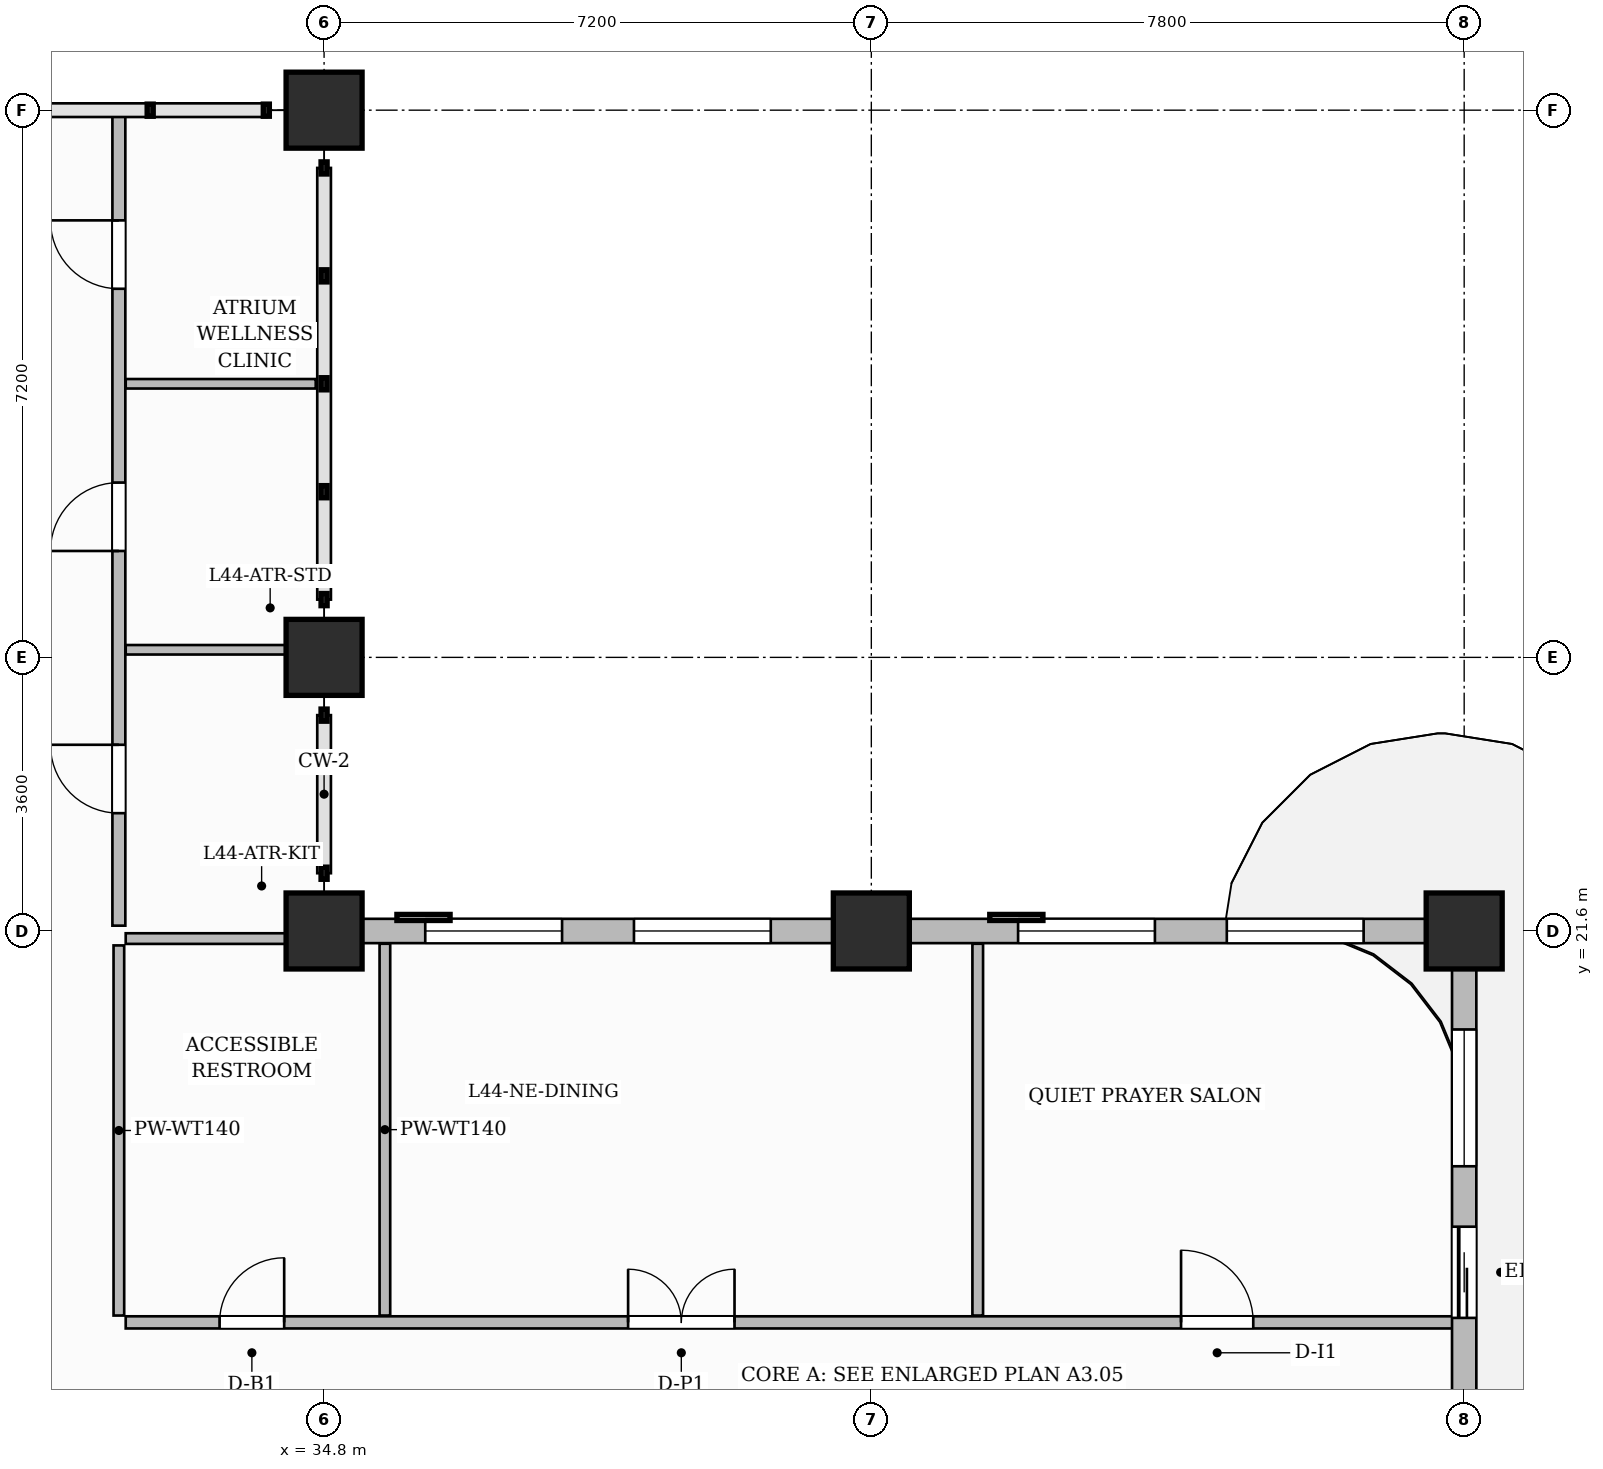
"""IFC4 building model, lengths in metres.
Left out: names, types, materials, properties, quantities, classifications, styles, units other than length and angle.
Written with IfcOpenShell. Run it as: python <this file> out.ifc"""

import sys

from ifc_helpers import new_model, si_unit, direction, frame, frame_2d, origin, origin_2d, place, context, subcontext, project, spatial, rectangle, extrude, source, transform, mapped, element, fill, save


model = new_model("IFC4")
c1 = context("Model", 3, precision=1e-05, world=origin(), true_north=direction((0.0, 1.0)))
c2 = subcontext(c1, "Body", "Model", "MODEL_VIEW")
j1 = project(units=[si_unit("LENGTHUNIT", "METRE"), si_unit("PLANEANGLEUNIT", "RADIAN")], contexts=[c1])
p1 = place(None, origin())
s1 = spatial("IfcSite", under=j1, at=p1, CompositionType="ELEMENT")
p2 = place(p1, origin())
s2 = spatial("IfcBuilding", under=s1, at=p2, CompositionType="ELEMENT")
p3 = place(p2, frame((0.0, 0.0, 177.25)))
s3 = spatial("IfcBuildingStorey", under=s2, at=p3, CompositionType="ELEMENT", Elevation=177.25)
m1 = source(origin(), c2, "Body", "SweptSolid", [
    extrude(rectangle(XDim=1.0, YDim=1.0, at=origin_2d()), origin(), (0.0, 0.0, 1.0), 3.85),
])
for number, where, z_axis, x_axis in (
    (1, (34.8, 21.6, 0.0), (0.0, 0.0, 1.0), (1.0, 0.0, 0.0)),
    (2, (34.8, 25.2, 0.0), (0.0, 0.0, 1.0), (1.0, 0.0, 0.0)),
    (3, (34.8, 32.4, 0.0), (0.0, 0.0, 1.0), (1.0, 0.0, 0.0)),
    (4, (42.0, 21.6, 0.0), (0.0, 0.0, 1.0), (1.0, 0.0, 0.0)),
    (5, (49.8, 21.6, 0.0), (0.0, 0.0, 1.0), (1.0, 0.0, 0.0)),
):
    element("IfcColumn", number, at=place(p3, frame(where, z_axis=z_axis, x_axis=x_axis)), inside=s3, PredefinedType="COLUMN", context=c2, shape_type="MappedRepresentation", body=[
        mapped(m1, transform((0.0, 0.0, 0.0), scale=1.0)),
    ])
p4 = place(p3, frame((32.19, 16.45, 0.0), z_axis=(0.0, 0.0, 1.0), x_axis=(1.0, 0.0, 0.0)))
e6 = element("IfcWall", 6, at=p4, inside=s3, PredefinedType="PARTITIONING", context=c2, shape_type="SweptSolid", body=[
    extrude(rectangle(XDim=17.47, YDim=0.16, at=frame_2d((8.735, 0.0))), origin(), (0.0, 0.0, 1.0), 3.6),
])
p5 = place(p4, frame((1.235, 0.0, 0.0)))
e7 = element("IfcOpeningElement", 7, at=p5, cuts=e6, PredefinedType="OPENING", context=c2, shape_type="SweptSolid", body=[
    extrude(rectangle(XDim=0.85, YDim=2.1, at=frame_2d((0.425, 1.05))), frame((0.0, 0.09, 0.0), z_axis=(0.0, -1.0, 0.0), x_axis=(1.0, 0.0, 0.0)), (0.0, 0.0, 1.0), 0.18),
])
p6 = place(p4, frame((6.61, 0.0, 0.0)))
e8 = element("IfcOpeningElement", 8, at=p6, cuts=e6, PredefinedType="OPENING", context=c2, shape_type="SweptSolid", body=[
    extrude(rectangle(XDim=1.4, YDim=2.35, at=frame_2d((0.7, 1.175))), frame((0.0, 0.09, 0.0), z_axis=(0.0, -1.0, 0.0), x_axis=(1.0, 0.0, 0.0)), (0.0, 0.0, 1.0), 0.18),
])
p7 = place(p4, frame((13.885, 0.0, 0.0)))
e9 = element("IfcOpeningElement", 9, at=p7, cuts=e6, PredefinedType="OPENING", context=c2, shape_type="SweptSolid", body=[
    extrude(rectangle(XDim=0.95, YDim=2.15, at=frame_2d((0.475, 1.075))), frame((0.0, 0.09, 0.0), z_axis=(0.0, -1.0, 0.0), x_axis=(1.0, 0.0, 0.0)), (0.0, 0.0, 1.0), 0.18),
])
p8 = place(p3, frame((32.1, 16.54, 0.0), z_axis=(0.0, 0.0, 1.0), x_axis=(0.0, 1.0, 0.0)))
e10 = element("IfcWall", 10, at=p8, inside=s3, PredefinedType="PARTITIONING", context=c2, shape_type="SweptSolid", body=[
    extrude(rectangle(XDim=4.87, YDim=0.14, at=frame_2d((2.435, 0.0))), origin(), (0.0, 0.0, 1.0), 3.6),
])
for number, where, z_axis, x_axis in (
    (11, (35.6, 16.54, 0.0), (0.0, 0.0, 1.0), (0.0, 1.0, 0.0)),
    (12, (43.4, 16.54, 0.0), (0.0, 0.0, 1.0), (0.0, 1.0, 0.0)),
):
    element("IfcWall", number, at=place(p3, frame(where, z_axis=z_axis, x_axis=x_axis)), inside=s3, PredefinedType="PARTITIONING", context=c2, shape_type="SweptSolid", body=[
        extrude(rectangle(XDim=4.892, YDim=0.14, at=frame_2d((2.446, 0.0))), origin(), (0.0, 0.0, 1.0), 3.6),
    ])
p9 = place(p3, frame((32.19, 21.5, 0.0), z_axis=(0.0, 0.0, 1.0), x_axis=(1.0, 0.0, 0.0)))
e13 = element("IfcWall", 13, at=p9, inside=s3, PredefinedType="PARTITIONING", context=c2, shape_type="SweptSolid", body=[
    extrude(rectangle(XDim=2.42, YDim=0.14, at=frame_2d((1.21, 0.0))), origin(), (0.0, 0.0, 1.0), 3.085),
])
p10 = place(p3, frame((32.1, 21.67, 0.0), z_axis=(0.0, 0.0, 1.0), x_axis=(0.0, 1.0, 0.0)))
e14 = element("IfcWall", 14, at=p10, inside=s3, PredefinedType="PARTITIONING", context=c2, shape_type="SweptSolid", body=[
    extrude(rectangle(XDim=10.702, YDim=0.17, at=frame_2d((5.351, 0.0))), origin(), (0.0, 0.0, 1.0), 3.6),
])
p11 = place(p10, frame((1.48, 0.0, 0.0)))
e15 = element("IfcOpeningElement", 15, at=p11, cuts=e14, PredefinedType="OPENING", context=c2, shape_type="SweptSolid", body=[
    extrude(rectangle(XDim=0.9, YDim=2.15, at=frame_2d((0.45, 1.075))), frame((0.0, 0.095, 0.0), z_axis=(0.0, -1.0, 0.0), x_axis=(1.0, 0.0, 0.0)), (0.0, 0.0, 1.0), 0.19),
])
p12 = place(p10, frame((4.93, 0.0, 0.0)))
e16 = element("IfcOpeningElement", 16, at=p12, cuts=e14, PredefinedType="OPENING", context=c2, shape_type="SweptSolid", body=[
    extrude(rectangle(XDim=0.9, YDim=2.15, at=frame_2d((0.45, 1.075))), frame((0.0, 0.095, 0.0), z_axis=(0.0, -1.0, 0.0), x_axis=(1.0, 0.0, 0.0)), (0.0, 0.0, 1.0), 0.19),
])
p13 = place(p10, frame((8.38, 0.0, 0.0)))
e17 = element("IfcOpeningElement", 17, at=p13, cuts=e14, PredefinedType="OPENING", context=c2, shape_type="SweptSolid", body=[
    extrude(rectangle(XDim=0.9, YDim=2.15, at=frame_2d((0.45, 1.075))), frame((0.0, 0.095, 0.0), z_axis=(0.0, -1.0, 0.0), x_axis=(1.0, 0.0, 0.0)), (0.0, 0.0, 1.0), 0.19),
])
for number, where, z_axis, x_axis in (
    (18, (32.19, 25.3, 0.0), (0.0, 0.0, 1.0), (1.0, 0.0, 0.0)),
    (19, (32.19, 28.8, 0.0), (0.0, 0.0, 1.0), (1.0, 0.0, 0.0)),
):
    element("IfcWall", number, at=place(p3, frame(where, z_axis=z_axis, x_axis=x_axis)), inside=s3, PredefinedType="PARTITIONING", context=c2, shape_type="SweptSolid", body=[
        extrude(rectangle(XDim=2.5, YDim=0.125, at=frame_2d((1.25, 0.0))), origin(), (0.0, 0.0, 1.0), 3.6),
    ])
p14 = place(p3, frame((49.8, 14.62, 0.0), z_axis=(0.0, 0.0, 1.0), x_axis=(0.0, 1.0, 0.0)))
e20 = element("IfcWall", 20, at=p14, inside=s3, PredefinedType="SOLIDWALL", context=c2, shape_type="SweptSolid", body=[
    extrude(rectangle(XDim=6.93, YDim=0.32, at=frame_2d((3.465, 0.0))), origin(), (0.0, 0.0, 1.0), 3.085),
])
p15 = place(p14, frame((1.889, 0.0, 0.0)))
e21 = element("IfcOpeningElement", 21, at=p15, cuts=e20, PredefinedType="OPENING", context=c2, shape_type="SweptSolid", body=[
    extrude(rectangle(XDim=1.2, YDim=2.2, at=frame_2d((0.6, 1.1))), frame((0.0, 0.17, 0.0), z_axis=(0.0, -1.0, 0.0), x_axis=(1.0, 0.0, 0.0)), (0.0, 0.0, 1.0), 0.34),
])
p16 = place(p14, frame((3.884, 0.0, 0.8)))
e22 = element("IfcOpeningElement", 22, at=p16, cuts=e20, PredefinedType="OPENING", context=c2, shape_type="SweptSolid", body=[
    extrude(rectangle(XDim=1.8, YDim=1.85, at=frame_2d((0.9, 0.925))), frame((0.0, 0.17, 0.0), z_axis=(0.0, -1.0, 0.0), x_axis=(1.0, 0.0, 0.0)), (0.0, 0.0, 1.0), 0.34),
])
p17 = place(p3, frame((34.8, 21.6, 0.0), z_axis=(0.0, 0.0, 1.0), x_axis=(1.0, 0.0, 0.0)))
e23 = element("IfcWall", 23, at=p17, inside=s3, PredefinedType="SOLIDWALL", context=c2, shape_type="SweptSolid", body=[
    extrude(rectangle(XDim=15.0, YDim=0.32, at=frame_2d((7.5, 0.0))), origin(), (0.0, 0.0, 1.0), 3.085),
])
p18 = place(p17, frame((1.331, 0.0, 0.8)))
e24 = element("IfcOpeningElement", 24, at=p18, cuts=e23, PredefinedType="OPENING", context=c2, shape_type="SweptSolid", body=[
    extrude(rectangle(XDim=1.8, YDim=1.85, at=frame_2d((0.9, 0.925))), frame((0.0, 0.17, 0.0), z_axis=(0.0, -1.0, 0.0), x_axis=(1.0, 0.0, 0.0)), (0.0, 0.0, 1.0), 0.34),
])
p19 = place(p17, frame((4.077, 0.0, 0.8)))
e25 = element("IfcOpeningElement", 25, at=p19, cuts=e23, PredefinedType="OPENING", context=c2, shape_type="SweptSolid", body=[
    extrude(rectangle(XDim=1.8, YDim=1.85, at=frame_2d((0.9, 0.925))), frame((0.0, 0.17, 0.0), z_axis=(0.0, -1.0, 0.0), x_axis=(1.0, 0.0, 0.0)), (0.0, 0.0, 1.0), 0.34),
])
p20 = place(p17, frame((9.131, 0.0, 0.8)))
e26 = element("IfcOpeningElement", 26, at=p20, cuts=e23, PredefinedType="OPENING", context=c2, shape_type="SweptSolid", body=[
    extrude(rectangle(XDim=1.8, YDim=1.85, at=frame_2d((0.9, 0.925))), frame((0.0, 0.17, 0.0), z_axis=(0.0, -1.0, 0.0), x_axis=(1.0, 0.0, 0.0)), (0.0, 0.0, 1.0), 0.34),
])
p21 = place(p17, frame((11.877, 0.0, 0.8)))
e27 = element("IfcOpeningElement", 27, at=p21, cuts=e23, PredefinedType="OPENING", context=c2, shape_type="SweptSolid", body=[
    extrude(rectangle(XDim=1.8, YDim=1.85, at=frame_2d((0.9, 0.925))), frame((0.0, 0.17, 0.0), z_axis=(0.0, -1.0, 0.0), x_axis=(1.0, 0.0, 0.0)), (0.0, 0.0, 1.0), 0.34),
])
m2 = source(origin(), c2, "Body", "SweptSolid", [
    extrude(rectangle(XDim=0.85, YDim=2.1, at=frame_2d((0.425, 1.05))), frame((0.0, 0.025, 0.0), z_axis=(0.0, -1.0, 0.0), x_axis=(1.0, 0.0, 0.0)), (0.0, 0.0, 1.0), 0.05),
])
p22 = place(p5, origin())
e28 = element("IfcDoor", 28, at=p22, inside=s3, OperationType="SINGLE_SWING_RIGHT", PredefinedType="DOOR", context=c2, shape_type="MappedRepresentation", body=[
    mapped(m2, transform((0.0, 0.0, 0.0), scale=1.0)),
])
fill(e7, e28)
m3 = source(origin(), c2, "Body", "SweptSolid", [
    extrude(rectangle(XDim=1.4, YDim=2.35, at=frame_2d((0.7, 1.175))), frame((0.0, 0.025, 0.0), z_axis=(0.0, -1.0, 0.0), x_axis=(1.0, 0.0, 0.0)), (0.0, 0.0, 1.0), 0.05),
])
p23 = place(p6, origin())
e29 = element("IfcDoor", 29, at=p23, inside=s3, OperationType="DOUBLE_DOOR_SINGLE_SWING", PredefinedType="DOOR", context=c2, shape_type="MappedRepresentation", body=[
    mapped(m3, transform((0.0, 0.0, 0.0), scale=1.0)),
])
fill(e8, e29)
m4 = source(origin(), c2, "Body", "SweptSolid", [
    extrude(rectangle(XDim=0.95, YDim=2.15, at=frame_2d((0.475, 1.075))), frame((0.0, 0.025, 0.0), z_axis=(0.0, -1.0, 0.0), x_axis=(1.0, 0.0, 0.0)), (0.0, 0.0, 1.0), 0.05),
])
p24 = place(p7, origin())
e30 = element("IfcDoor", 30, at=p24, inside=s3, OperationType="SINGLE_SWING_LEFT", PredefinedType="DOOR", context=c2, shape_type="MappedRepresentation", body=[
    mapped(m4, transform((0.0, 0.0, 0.0), scale=1.0)),
])
fill(e9, e30)
m5 = source(origin(), c2, "Body", "SweptSolid", [
    extrude(rectangle(XDim=0.9, YDim=2.15, at=frame_2d((0.45, 1.075))), frame((0.0, 0.025, 0.0), z_axis=(0.0, -1.0, 0.0), x_axis=(1.0, 0.0, 0.0)), (0.0, 0.0, 1.0), 0.05),
])
p25 = place(p11, origin())
e31 = element("IfcDoor", 31, at=p25, inside=s3, OperationType="SINGLE_SWING_RIGHT", PredefinedType="DOOR", context=c2, shape_type="MappedRepresentation", body=[
    mapped(m5, transform((0.0, 0.0, 0.0), scale=1.0)),
])
fill(e15, e31)
p26 = place(p12, origin())
e32 = element("IfcDoor", 32, at=p26, inside=s3, OperationType="SINGLE_SWING_LEFT", PredefinedType="DOOR", context=c2, shape_type="MappedRepresentation", body=[
    mapped(m5, transform((0.0, 0.0, 0.0), scale=1.0)),
])
fill(e16, e32)
p27 = place(p13, origin())
e33 = element("IfcDoor", 33, at=p27, inside=s3, OperationType="SINGLE_SWING_RIGHT", PredefinedType="DOOR", context=c2, shape_type="MappedRepresentation", body=[
    mapped(m5, transform((0.0, 0.0, 0.0), scale=1.0)),
])
fill(e17, e33)
m6 = source(origin(), c2, "Body", "SweptSolid", [
    extrude(rectangle(XDim=1.2, YDim=2.2, at=frame_2d((0.6, 1.1))), frame((0.0, 0.025, 0.0), z_axis=(0.0, -1.0, 0.0), x_axis=(1.0, 0.0, 0.0)), (0.0, 0.0, 1.0), 0.05),
])
p28 = place(p15, origin())
e34 = element("IfcDoor", 34, at=p28, inside=s3, OperationType="SLIDING_TO_LEFT", PredefinedType="DOOR", context=c2, shape_type="MappedRepresentation", body=[
    mapped(m6, transform((0.0, 0.0, 0.0), scale=1.0)),
])
fill(e21, e34)
m7 = source(origin(), c2, "Body", "SweptSolid", [
    extrude(rectangle(XDim=1.8, YDim=1.85, at=frame_2d((0.9, 0.925))), frame((0.0, 0.03, 0.0), z_axis=(0.0, -1.0, 0.0), x_axis=(1.0, 0.0, 0.0)), (0.0, 0.0, 1.0), 0.06),
])
p29 = place(p16, origin())
e35 = element("IfcWindow", 35, at=p29, inside=s3, PartitioningType="DOUBLE_PANEL_VERTICAL", PredefinedType="WINDOW", context=c2, shape_type="MappedRepresentation", body=[
    mapped(m7, transform((0.0, 0.0, 0.0), scale=1.0)),
])
fill(e22, e35)
p30 = place(p18, origin())
e36 = element("IfcWindow", 36, at=p30, inside=s3, PartitioningType="DOUBLE_PANEL_VERTICAL", PredefinedType="WINDOW", context=c2, shape_type="MappedRepresentation", body=[
    mapped(m7, transform((0.0, 0.0, 0.0), scale=1.0)),
])
fill(e24, e36)
p31 = place(p19, origin())
e37 = element("IfcWindow", 37, at=p31, inside=s3, PartitioningType="DOUBLE_PANEL_VERTICAL", PredefinedType="WINDOW", context=c2, shape_type="MappedRepresentation", body=[
    mapped(m7, transform((0.0, 0.0, 0.0), scale=1.0)),
])
fill(e25, e37)
p32 = place(p20, origin())
e38 = element("IfcWindow", 38, at=p32, inside=s3, PartitioningType="DOUBLE_PANEL_VERTICAL", PredefinedType="WINDOW", context=c2, shape_type="MappedRepresentation", body=[
    mapped(m7, transform((0.0, 0.0, 0.0), scale=1.0)),
])
fill(e26, e38)
p33 = place(p21, origin())
e39 = element("IfcWindow", 39, at=p33, inside=s3, PartitioningType="DOUBLE_PANEL_VERTICAL", PredefinedType="WINDOW", context=c2, shape_type="MappedRepresentation", body=[
    mapped(m7, transform((0.0, 0.0, 0.0), scale=1.0)),
])
fill(e27, e39)
save(model, sys.argv[1])
